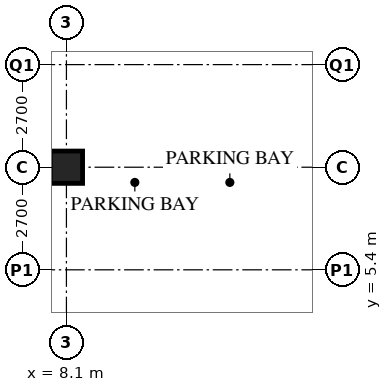
"""IFC4 building model, lengths in metres.
Left out: names, types, materials, properties, quantities, classifications, styles, units other than length and angle.
Written with IfcOpenShell. Run it as: python <this file> out.ifc"""

import sys

from ifc_helpers import new_model, si_unit, direction, frame, origin, origin_2d, place, context, subcontext, project, spatial, hollow_rectangle, extrude, element, save


model = new_model("IFC4")
c1 = context("Model", 3, precision=1e-05, world=origin(), true_north=direction((0.0, 1.0)))
c2 = subcontext(c1, "Body", "Model", "MODEL_VIEW")
j1 = project(units=[si_unit("LENGTHUNIT", "METRE"), si_unit("PLANEANGLEUNIT", "RADIAN")], contexts=[c1])
p1 = place(None, origin())
s1 = spatial("IfcSite", under=j1, at=p1, CompositionType="ELEMENT")
p2 = place(p1, origin())
s2 = spatial("IfcBuilding", under=s1, at=p2, CompositionType="ELEMENT")
p3 = place(p2, frame((0.0, 0.0, -4.2)))
s3 = spatial("IfcBuildingStorey", under=s2, at=p3, CompositionType="ELEMENT", Elevation=-4.2)
p4 = place(p3, frame((8.1, 8.1, 0.0), z_axis=(0.0, 0.0, 1.0), x_axis=(1.0, 0.0, 0.0)))
e1 = element("IfcColumn", 1, at=p4, inside=s3, PredefinedType="COLUMN", context=c2, shape_type="SweptSolid", body=[
    extrude(hollow_rectangle(XDim=0.85, YDim=0.85, WallThickness=0.085, at=origin_2d()), origin(), (0.0, 0.0, 1.0), 4.2),
])
save(model, sys.argv[1])
